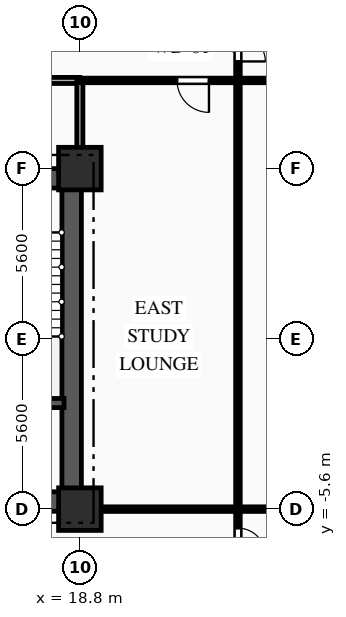
"""IFC4 building model, lengths in metres.
Left out: names, types, materials, properties, quantities, classifications, styles, units other than length and angle.
Written with IfcOpenShell. Run it as: python <this file> out.ifc"""

import sys

from ifc_helpers import new_model, si_unit, direction, frame, frame_2d, origin, origin_2d, place, context, subcontext, project, spatial, rectangle, extrude, element, fill, save


model = new_model("IFC4")
c1 = context("Model", 3, precision=1e-05, world=origin(), true_north=direction((0.0, 1.0)))
c2 = subcontext(c1, "Body", "Model", "MODEL_VIEW")
j1 = project(units=[si_unit("LENGTHUNIT", "METRE"), si_unit("PLANEANGLEUNIT", "RADIAN")], contexts=[c1])
p1 = place(None, origin())
s1 = spatial("IfcSite", under=j1, at=p1, CompositionType="ELEMENT")
p2 = place(p1, origin())
s2 = spatial("IfcBuilding", under=s1, at=p2, CompositionType="ELEMENT")
p3 = place(p2, frame((0.0, 0.0, 18.0)))
s3 = spatial("IfcBuildingStorey", under=s2, at=p3, CompositionType="ELEMENT", Elevation=18.0)
for number, where, z_axis, x_axis in (
    (1, (18.8, -5.6, 0.0), (0.0, 0.0, 1.0), (1.0, 0.0, 0.0)),
    (2, (18.8, 5.6, 0.0), (0.0, 0.0, 1.0), (1.0, 0.0, 0.0)),
):
    element("IfcColumn", number, at=place(p3, frame(where, z_axis=z_axis, x_axis=x_axis)), inside=s3, PredefinedType="COLUMN", context=c2, shape_type="SweptSolid", body=[
        extrude(rectangle(XDim=1.4, YDim=1.4, at=origin_2d()), origin(), (0.0, 0.0, 1.0), 4.5),
    ])
p4 = place(p3, frame((9.2, 5.28, 0.0), z_axis=(0.0, 0.0, 1.0), x_axis=(1.0, 0.0, 0.0)))
e3 = element("IfcWall", 3, at=p4, inside=s3, PredefinedType="SHEAR", context=c2, shape_type="SweptSolid", body=[
    extrude(rectangle(XDim=9.6, YDim=0.64, at=frame_2d((4.8, 0.0))), origin(), (0.0, 0.0, 1.0), 4.17),
])
p5 = place(p4, frame((6.95, 0.0, 0.0)))
e4 = element("IfcOpeningElement", 4, at=p5, cuts=e3, PredefinedType="OPENING", context=c2, shape_type="SweptSolid", body=[
    extrude(rectangle(XDim=1.1, YDim=2.15, at=frame_2d((0.55, 1.075))), frame((0.0, 0.33, 0.0), z_axis=(0.0, -1.0, 0.0), x_axis=(1.0, 0.0, 0.0)), (0.0, 0.0, 1.0), 0.66),
])
p6 = place(p4, frame((3.775, 0.0, 0.0)))
e5 = element("IfcOpeningElement", 5, at=p6, cuts=e3, PredefinedType="OPENING", context=c2, shape_type="SweptSolid", body=[
    extrude(rectangle(XDim=1.05, YDim=2.1, at=frame_2d((0.525, 1.05))), frame((0.0, 0.33, 0.0), z_axis=(0.0, -1.0, 0.0), x_axis=(1.0, 0.0, 0.0)), (0.0, 0.0, 1.0), 0.66),
])
p7 = place(p3, frame((9.2, -5.35, 0.0), z_axis=(0.0, 0.0, 1.0), x_axis=(1.0, 0.0, 0.0)))
e6 = element("IfcWall", 6, at=p7, inside=s3, PredefinedType="SHEAR", context=c2, shape_type="SweptSolid", body=[
    extrude(rectangle(XDim=9.6, YDim=0.64, at=frame_2d((4.8, 0.0))), origin(), (0.0, 0.0, 1.0), 4.17),
])
p8 = place(p7, frame((7.65, 0.0, 0.0)))
e7 = element("IfcOpeningElement", 7, at=p8, cuts=e6, PredefinedType="OPENING", context=c2, shape_type="SweptSolid", body=[
    extrude(rectangle(XDim=0.9, YDim=2.1, at=frame_2d((0.45, 1.05))), frame((0.0, 0.33, 0.0), z_axis=(0.0, -1.0, 0.0), x_axis=(1.0, 0.0, 0.0)), (0.0, 0.0, 1.0), 0.66),
])
p9 = place(p3, frame((18.53, -5.05, 0.0), z_axis=(0.0, 0.0, 1.0), x_axis=(0.0, 1.0, 0.0)))
e8 = element("IfcWall", 8, at=p9, inside=s3, PredefinedType="SHEAR", context=c2, shape_type="SweptSolid", body=[
    extrude(rectangle(XDim=10.1, YDim=0.64, at=frame_2d((5.05, 0.0))), origin(), (0.0, 0.0, 1.0), 4.17),
])
p10 = place(p3, frame((15.1, -2.11, 0.0), z_axis=(0.0, 0.0, 1.0), x_axis=(1.0, 0.0, 0.0)))
e9 = element("IfcWall", 9, at=p10, inside=s3, PredefinedType="SHEAR", context=c2, shape_type="SweptSolid", body=[
    extrude(rectangle(XDim=3.18, YDim=0.3, at=frame_2d((1.59, 0.0))), origin(), (0.0, 0.0, 1.0), 4.17),
])
p11 = place(p3, frame((18.8, 8.5, 0.0), z_axis=(0.0, 0.0, 1.0), x_axis=(-1.0, 0.0, 0.0)))
e10 = element("IfcWall", 10, at=p11, inside=s3, PredefinedType="PARTITIONING", context=c2, shape_type="SweptSolid", body=[
    extrude(rectangle(XDim=6.8, YDim=0.2, at=frame_2d((3.4, 0.0))), origin(), (0.0, 0.0, 1.0), 4.17),
])
p12 = place(p11, frame((3.985, 0.0, 0.0)))
e11 = element("IfcOpeningElement", 11, at=p12, cuts=e10, PredefinedType="OPENING", context=c2, shape_type="SweptSolid", body=[
    extrude(rectangle(XDim=1.1, YDim=2.15, at=frame_2d((0.55, 1.075))), frame((0.0, 0.11, 0.0), z_axis=(0.0, -1.0, 0.0), x_axis=(1.0, 0.0, 0.0)), (0.0, 0.0, 1.0), 0.22),
])
p13 = place(p3, frame((18.8, 5.6, 0.0), z_axis=(0.0, 0.0, 1.0), x_axis=(0.0, 1.0, 0.0)))
e12 = element("IfcWall", 12, at=p13, inside=s3, PredefinedType="PARTITIONING", context=c2, shape_type="SweptSolid", body=[
    extrude(rectangle(XDim=2.9, YDim=0.2, at=frame_2d((1.45, 0.0))), origin(), (0.0, 0.0, 1.0), 3.655),
])
p14 = place(p3, frame((24.0, 10.65, 0.0), z_axis=(0.0, 0.0, 1.0), x_axis=(0.0, -1.0, 0.0)))
e13 = element("IfcWall", 13, at=p14, inside=s3, PredefinedType="PARTITIONING", context=c2, shape_type="SweptSolid", body=[
    extrude(rectangle(XDim=2.15, YDim=0.15, at=frame_2d((1.075, 0.0))), origin(), (0.0, 0.0, 1.0), 4.17),
])
p15 = place(p14, frame((0.625, 0.0, 0.0)))
e14 = element("IfcOpeningElement", 14, at=p15, cuts=e13, PredefinedType="OPENING", context=c2, shape_type="SweptSolid", body=[
    extrude(rectangle(XDim=0.9, YDim=2.1, at=frame_2d((0.45, 1.05))), frame((0.0, 0.085, 0.0), z_axis=(0.0, -1.0, 0.0), x_axis=(1.0, 0.0, 0.0)), (0.0, 0.0, 1.0), 0.17),
])
p16 = place(p3, frame((24.0, 8.5, 0.0), z_axis=(0.0, 0.0, 1.0), x_axis=(-1.0, 0.0, 0.0)))
e15 = element("IfcWall", 15, at=p16, inside=s3, PredefinedType="PARTITIONING", context=c2, shape_type="SweptSolid", body=[
    extrude(rectangle(XDim=5.2, YDim=0.15, at=frame_2d((2.6, 0.0))), origin(), (0.0, 0.0, 1.0), 4.17),
])
p17 = place(p16, frame((0.954, 0.0, 0.0)))
e16 = element("IfcOpeningElement", 16, at=p17, cuts=e15, PredefinedType="OPENING", context=c2, shape_type="SweptSolid", body=[
    extrude(rectangle(XDim=1.05, YDim=2.15, at=frame_2d((0.525, 1.075))), frame((0.0, 0.085, 0.0), z_axis=(0.0, -1.0, 0.0), x_axis=(1.0, 0.0, 0.0)), (0.0, 0.0, 1.0), 0.17),
])
p18 = place(p3, frame((24.0, -5.6, 0.0), z_axis=(0.0, 0.0, 1.0), x_axis=(0.0, -1.0, 0.0)))
e17 = element("IfcWall", 17, at=p18, inside=s3, PredefinedType="PARTITIONING", context=c2, shape_type="SweptSolid", body=[
    extrude(rectangle(XDim=2.15, YDim=0.15, at=frame_2d((1.075, 0.0))), origin(), (0.0, 0.0, 1.0), 4.17),
])
p19 = place(p18, frame((0.625, 0.0, 0.0)))
e18 = element("IfcOpeningElement", 18, at=p19, cuts=e17, PredefinedType="OPENING", context=c2, shape_type="SweptSolid", body=[
    extrude(rectangle(XDim=0.9, YDim=2.1, at=frame_2d((0.45, 1.05))), frame((0.0, 0.085, 0.0), z_axis=(0.0, -1.0, 0.0), x_axis=(1.0, 0.0, 0.0)), (0.0, 0.0, 1.0), 0.17),
])
p20 = place(p3, frame((18.8, -5.6, 0.0), z_axis=(0.0, 0.0, 1.0), x_axis=(1.0, 0.0, 0.0)))
e19 = element("IfcWall", 19, at=p20, inside=s3, PredefinedType="PARTITIONING", context=c2, shape_type="SweptSolid", body=[
    extrude(rectangle(XDim=5.2, YDim=0.15, at=frame_2d((2.6, 0.0))), origin(), (0.0, 0.0, 1.0), 4.17),
])
p21 = place(p3, frame((24.0, 8.5, 0.0), z_axis=(0.0, 0.0, 1.0), x_axis=(1.0, 0.0, 0.0)))
e20 = element("IfcWall", 20, at=p21, inside=s3, PredefinedType="PARTITIONING", context=c2, shape_type="SweptSolid", body=[
    extrude(rectangle(XDim=2.65, YDim=0.15, at=frame_2d((1.325, 0.0))), origin(), (0.0, 0.0, 1.0), 4.17),
])
p22 = place(p21, frame((0.965, 0.0, 0.0)))
e21 = element("IfcOpeningElement", 21, at=p22, cuts=e20, PredefinedType="OPENING", context=c2, shape_type="SweptSolid", body=[
    extrude(rectangle(XDim=1.05, YDim=2.15, at=frame_2d((0.525, 1.075))), frame((0.0, 0.085, 0.0), z_axis=(0.0, -1.0, 0.0), x_axis=(1.0, 0.0, 0.0)), (0.0, 0.0, 1.0), 0.17),
])
p23 = place(p3, frame((26.65, -5.6, 0.0), z_axis=(0.0, 0.0, 1.0), x_axis=(-1.0, 0.0, 0.0)))
e22 = element("IfcWall", 22, at=p23, inside=s3, PredefinedType="PARTITIONING", context=c2, shape_type="SweptSolid", body=[
    extrude(rectangle(XDim=2.65, YDim=0.15, at=frame_2d((1.325, 0.0))), origin(), (0.0, 0.0, 1.0), 4.17),
])
p24 = place(p23, frame((0.635, 0.0, 0.0)))
e23 = element("IfcOpeningElement", 23, at=p24, cuts=e22, PredefinedType="OPENING", context=c2, shape_type="SweptSolid", body=[
    extrude(rectangle(XDim=1.05, YDim=2.15, at=frame_2d((0.525, 1.075))), frame((0.0, 0.085, 0.0), z_axis=(0.0, -1.0, 0.0), x_axis=(1.0, 0.0, 0.0)), (0.0, 0.0, 1.0), 0.17),
])
p25 = place(p3, frame((24.0, -5.6, 0.0), z_axis=(0.0, 0.0, 1.0), x_axis=(0.0, 1.0, 0.0)))
e24 = element("IfcWall", 24, at=p25, inside=s3, PredefinedType="PARTITIONING", context=c2, shape_type="SweptSolid", body=[
    extrude(rectangle(XDim=14.1, YDim=0.15, at=frame_2d((7.05, 0.0))), origin(), (0.0, 0.0, 1.0), 4.17),
])
p26 = place(p15, origin())
e25 = element("IfcDoor", 25, at=p26, inside=s3, OperationType="SINGLE_SWING_RIGHT", PredefinedType="DOOR", context=c2, shape_type="SweptSolid", body=[
    extrude(rectangle(XDim=0.9, YDim=2.1, at=frame_2d((0.45, 1.05))), frame((0.0, 0.025, 0.0), z_axis=(0.0, -1.0, 0.0), x_axis=(1.0, 0.0, 0.0)), (0.0, 0.0, 1.0), 0.05),
])
fill(e14, e25)
p27 = place(p17, origin())
e26 = element("IfcDoor", 26, at=p27, inside=s3, OperationType="SINGLE_SWING_LEFT", PredefinedType="DOOR", context=c2, shape_type="SweptSolid", body=[
    extrude(rectangle(XDim=1.05, YDim=2.15, at=frame_2d((0.525, 1.075))), frame((0.0, 0.025, 0.0), z_axis=(0.0, -1.0, 0.0), x_axis=(1.0, 0.0, 0.0)), (0.0, 0.0, 1.0), 0.05),
])
fill(e16, e26)
p28 = place(p19, origin())
e27 = element("IfcDoor", 27, at=p28, inside=s3, OperationType="SINGLE_SWING_RIGHT", PredefinedType="DOOR", context=c2, shape_type="SweptSolid", body=[
    extrude(rectangle(XDim=0.9, YDim=2.1, at=frame_2d((0.45, 1.05))), frame((0.0, 0.025, 0.0), z_axis=(0.0, -1.0, 0.0), x_axis=(1.0, 0.0, 0.0)), (0.0, 0.0, 1.0), 0.05),
])
fill(e18, e27)
save(model, sys.argv[1])
